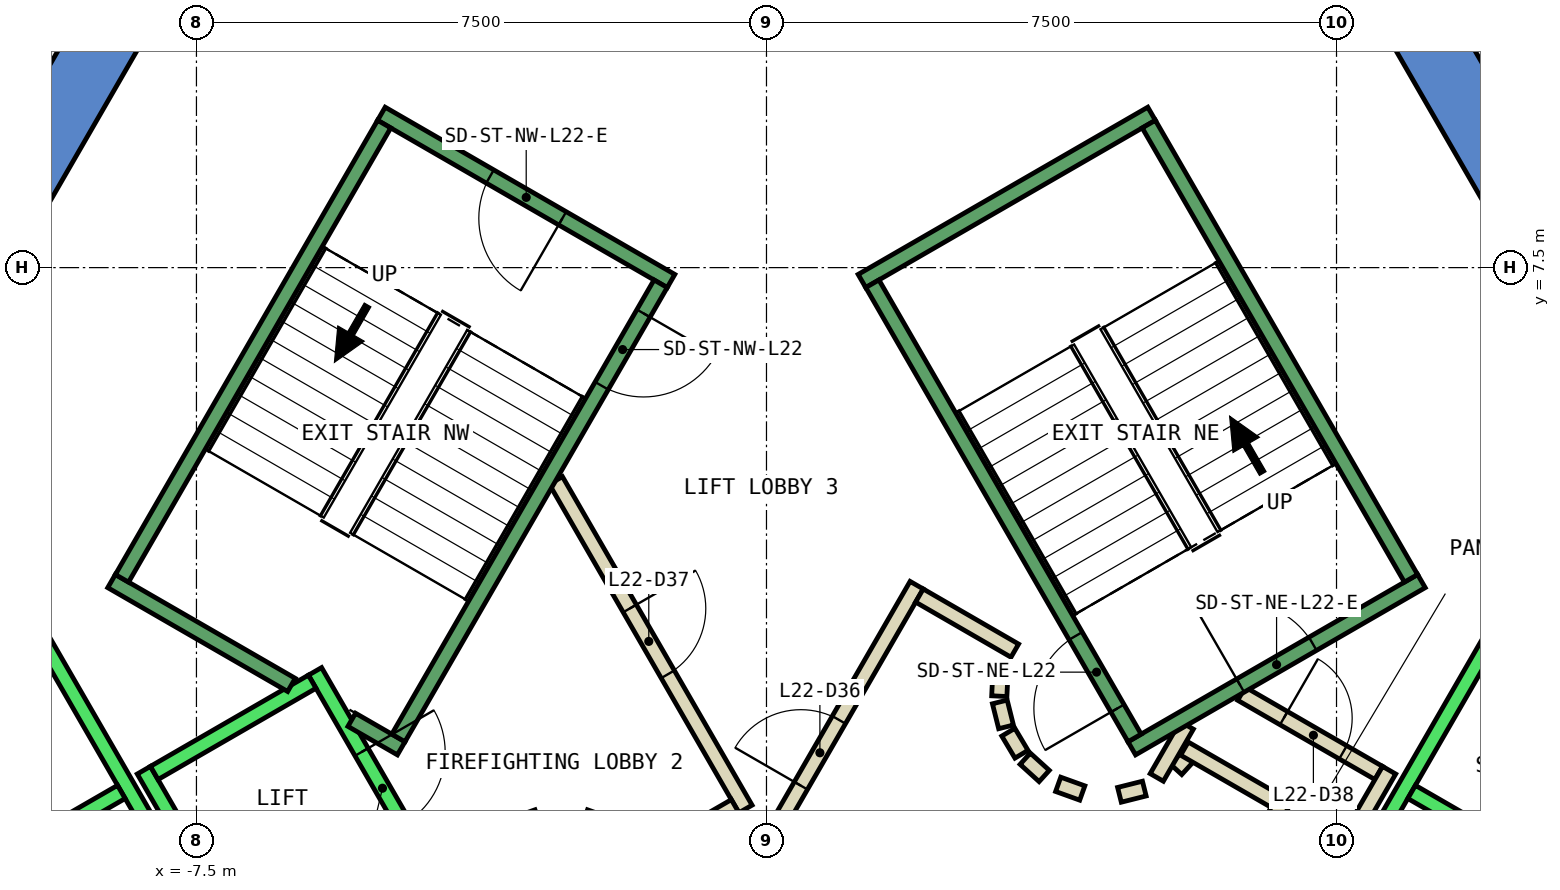
"""IFC4 building model, lengths in metres.
Left out: names, types, materials, properties, quantities, classifications, styles, units other than length and angle.
Written with IfcOpenShell. Run it as: python <this file> out.ifc"""

import sys

from ifc_helpers import new_model, si_unit, direction, frame, frame_2d, origin, place, context, subcontext, project, spatial, polyline, rectangle, outline, extrude, element, fill, save


model = new_model("IFC4")
c1 = context("Model", 3, precision=1e-05, world=origin(), true_north=direction((0.0, 1.0)))
c2 = subcontext(c1, "Body", "Model", "MODEL_VIEW")
j1 = project(units=[si_unit("LENGTHUNIT", "METRE"), si_unit("PLANEANGLEUNIT", "RADIAN")], contexts=[c1])
p1 = place(None, origin())
s1 = spatial("IfcSite", under=j1, at=p1, CompositionType="ELEMENT")
p2 = place(p1, origin())
s2 = spatial("IfcBuilding", under=s1, at=p2, CompositionType="ELEMENT")
p3 = place(p2, frame((0.0, 0.0, 103.4)))
s3 = spatial("IfcBuildingStorey", under=s2, at=p3, CompositionType="ELEMENT", Elevation=103.4)
p4 = place(p3, frame((0.0, 0.0, -0.4)))
e1 = element("IfcWall", 1, at=p4, inside=s3, PredefinedType="SHEAR", context=c2, shape_type="SweptSolid", body=[
    extrude(outline(polyline([(8.517, 11.748), (7.738, 11.298), (12.817, 2.5), (13.856, 2.5), (8.517, 11.748)])), origin(), (0.0, 0.0, 1.0), 4.2),
])
p5 = place(p3, frame((0.0, 0.0, -0.4)))
e2 = element("IfcWall", 2, at=p5, inside=s3, PredefinedType="SHEAR", context=c2, shape_type="SweptSolid", body=[
    extrude(outline(polyline([(-12.267, 5.252), (-11.488, 4.802), (-6.409, 13.6), (-6.928, 14.5), (-12.267, 5.252)])), origin(), (0.0, 0.0, 1.0), 4.2),
])
p6 = place(p3, frame((0.0, 0.0, -0.4)))
e3 = element("IfcWall", 3, at=p6, inside=s3, PredefinedType="SHEAR", context=c2, shape_type="SweptSolid", body=[
    extrude(outline(polyline([(-13.856, 2.5), (-6.928, -9.5), (-6.409, -8.6), (-12.817, 2.5), (-13.856, 2.5)])), origin(), (0.0, 0.0, 1.0), 4.2),
])
p7 = place(p3, frame((5.39, 0.898, 0.0), z_axis=(0.0, 0.0, 1.0), x_axis=(0.673828488714, 0.738887791073, 0.0)))
e4 = element("IfcWall", 4, at=p7, inside=s3, PredefinedType="PARTITIONING", context=c2, shape_type="SweptSolid", body=[
    extrude(rectangle(XDim=0.263, YDim=0.2, at=frame_2d((0.131, 0.0))), origin(), (0.0, 0.0, 1.0), 3.8),
])
p8 = place(p3, frame((5.499, 1.172, 0.0), z_axis=(0.0, 0.0, 1.0), x_axis=(0.866333505267, -0.499465972466, 0.0)))
e5 = element("IfcWall", 5, at=p8, inside=s3, PredefinedType="PARTITIONING", context=c2, shape_type="SweptSolid", body=[
    extrude(rectangle(XDim=1.374, YDim=0.2, at=frame_2d((0.687, 0.0))), origin(), (0.0, 0.0, 1.0), 3.8),
])
p9 = place(p3, frame((6.826, 0.522, 0.0), z_axis=(0.0, 0.0, 1.0), x_axis=(-0.500016722714, -0.866015748706, 0.0)))
e6 = element("IfcWall", 6, at=p9, inside=s3, PredefinedType="PARTITIONING", context=c2, shape_type="SweptSolid", body=[
    extrude(rectangle(XDim=1.7, YDim=0.2, at=frame_2d((0.85, 0.0))), origin(), (0.0, 0.0, 1.0), 3.8),
])
p10 = place(p3, frame((6.25, 1.894, 0.0), z_axis=(0.0, 0.0, 1.0), x_axis=(0.866043184279, -0.499969202016, 0.0)))
e7 = element("IfcWall", 7, at=p10, inside=s3, PredefinedType="PARTITIONING", context=c2, shape_type="SweptSolid", body=[
    extrude(rectangle(XDim=2.084, YDim=0.2, at=frame_2d((1.042, 0.0))), origin(), (0.0, 0.0, 1.0), 3.8),
])
p11 = place(p10, frame((0.642, 0.0, 0.0)))
e8 = element("IfcOpeningElement", 8, at=p11, cuts=e7, PredefinedType="OPENING", context=c2, shape_type="SweptSolid", body=[
    extrude(rectangle(XDim=0.9, YDim=2.1, at=frame_2d((0.45, 1.05))), frame((0.0, 0.11, 0.0), z_axis=(0.0, -1.0, 0.0), x_axis=(1.0, 0.0, 0.0)), (0.0, 0.0, 1.0), 0.22),
])
p12 = place(p3, frame((8.192, 0.888, 0.0), z_axis=(0.0, 0.0, 1.0), x_axis=(-0.499940625693, -0.866059680843, 0.0)))
e9 = element("IfcWall", 9, at=p12, inside=s3, PredefinedType="PARTITIONING", context=c2, shape_type="SweptSolid", body=[
    extrude(rectangle(XDim=2.68, YDim=0.2, at=frame_2d((1.34, 0.0))), origin(), (0.0, 0.0, 1.0), 3.8),
])
p13 = place(p3, frame((5.135, 0.793, 0.0), z_axis=(0.0, 0.0, 1.0), x_axis=(0.499526442893, 0.866298639529, 0.0)))
e10 = element("IfcWall", 10, at=p13, inside=s3, PredefinedType="PARTITIONING", context=c2, shape_type="SweptSolid", body=[
    extrude(rectangle(XDim=0.791, YDim=0.2, at=frame_2d((0.396, 0.0))), origin(), (0.0, 0.0, 1.0), 3.8),
])
p14 = place(p3, frame((-0.52, -1.0, 0.0), z_axis=(0.0, 0.0, 1.0), x_axis=(0.50011622646, 0.865958290007, 0.0)))
e11 = element("IfcWall", 11, at=p14, inside=s3, PredefinedType="PARTITIONING", context=c2, shape_type="SweptSolid", body=[
    extrude(rectangle(XDim=4.991, YDim=0.2, at=frame_2d((2.496, 0.0))), origin(), (0.0, 0.0, 1.0), 3.8),
])
p15 = place(p14, frame((1.945, 0.0, 0.0)))
e12 = element("IfcOpeningElement", 12, at=p15, cuts=e11, PredefinedType="OPENING", context=c2, shape_type="SweptSolid", body=[
    extrude(rectangle(XDim=1.0, YDim=2.1, at=frame_2d((0.5, 1.05))), frame((0.0, 0.11, 0.0), z_axis=(0.0, -1.0, 0.0), x_axis=(1.0, 0.0, 0.0)), (0.0, 0.0, 1.0), 0.22),
])
p16 = place(p3, frame((2.012, 3.186, 0.0), z_axis=(0.0, 0.0, 1.0), x_axis=(0.865891012941, -0.500232699559, 0.0)))
e13 = element("IfcWall", 13, at=p16, inside=s3, PredefinedType="PARTITIONING", context=c2, shape_type="SweptSolid", body=[
    extrude(rectangle(XDim=1.449, YDim=0.2, at=frame_2d((0.725, 0.0))), origin(), (0.0, 0.0, 1.0), 3.8),
])
p17 = place(p3, frame((3.079, 2.199, 0.0), z_axis=(0.0, 0.0, 1.0), x_axis=(-0.047771483479, -0.998858290933, 0.0)))
e14 = element("IfcWall", 14, at=p17, inside=s3, PredefinedType="PARTITIONING", context=c2, shape_type="SweptSolid", body=[
    extrude(rectangle(XDim=0.337, YDim=0.2, at=frame_2d((0.169, 0.0))), origin(), (0.0, 0.0, 1.0), 3.8),
])
p18 = place(p3, frame((3.07, 1.786, 0.0), z_axis=(0.0, 0.0, 1.0), x_axis=(0.242705583207, -0.970099994784, 0.0)))
e15 = element("IfcWall", 15, at=p18, inside=s3, PredefinedType="PARTITIONING", context=c2, shape_type="SweptSolid", body=[
    extrude(rectangle(XDim=0.338, YDim=0.2, at=frame_2d((0.169, 0.0))), origin(), (0.0, 0.0, 1.0), 3.8),
])
for number, where, z_axis, x_axis in (
    (16, (3.182, 1.388, 0.0), (0.0, 0.0, 1.0), (0.512, -0.859, 0.0)),
    (17, (3.404, 1.039, 0.0), (0.0, 0.0, 1.0), (0.74, -0.672, 0.0)),
):
    element("IfcWall", number, at=place(p3, frame(where, z_axis=z_axis, x_axis=x_axis)), inside=s3, PredefinedType="PARTITIONING", context=c2, shape_type="SweptSolid", body=[
        extrude(rectangle(XDim=0.338, YDim=0.2, at=frame_2d((0.169, 0.0))), origin(), (0.0, 0.0, 1.0), 3.8),
    ])
p19 = place(p3, frame((3.838, 0.702, 0.0), z_axis=(0.0, 0.0, 1.0), x_axis=(0.941035081519, -0.338308993895, 0.0)))
e18 = element("IfcWall", 18, at=p19, inside=s3, PredefinedType="PARTITIONING", context=c2, shape_type="SweptSolid", body=[
    extrude(rectangle(XDim=0.337, YDim=0.2, at=frame_2d((0.168, 0.0))), origin(), (0.0, 0.0, 1.0), 3.8),
])
p20 = place(p3, frame((4.644, 0.564, 0.0), z_axis=(0.0, 0.0, 1.0), x_axis=(0.969929076366, 0.243387729394, 0.0)))
e19 = element("IfcWall", 19, at=p20, inside=s3, PredefinedType="PARTITIONING", context=c2, shape_type="SweptSolid", body=[
    extrude(rectangle(XDim=0.337, YDim=0.2, at=frame_2d((0.168, 0.0))), origin(), (0.0, 0.0, 1.0), 3.8),
])
p21 = place(p3, frame((-2.771, 4.7, 0.0), z_axis=(0.0, 0.0, 1.0), x_axis=(0.499969479948, -0.866043023828, 0.0)))
e20 = element("IfcWall", 20, at=p21, inside=s3, PredefinedType="PARTITIONING", context=c2, shape_type="SweptSolid", body=[
    extrude(rectangle(XDim=4.99, YDim=0.2, at=frame_2d((2.495, 0.0))), origin(), (0.0, 0.0, 1.0), 3.8),
])
p22 = place(p21, frame((1.945, 0.0, 0.0)))
e21 = element("IfcOpeningElement", 21, at=p22, cuts=e20, PredefinedType="OPENING", context=c2, shape_type="SweptSolid", body=[
    extrude(rectangle(XDim=1.0, YDim=2.1, at=frame_2d((0.5, 1.05))), frame((0.0, 0.11, 0.0), z_axis=(0.0, -1.0, 0.0), x_axis=(1.0, 0.0, 0.0)), (0.0, 0.0, 1.0), 0.22),
])
p23 = place(p3, frame((-0.412, 0.414, 0.0), z_axis=(0.0, 0.0, 1.0), x_axis=(-0.866017369001, -0.500013916395, 0.0)))
e22 = element("IfcWall", 22, at=p23, inside=s3, PredefinedType="PARTITIONING", context=c2, shape_type="SweptSolid", body=[
    extrude(rectangle(XDim=1.45, YDim=0.2, at=frame_2d((0.725, 0.0))), origin(), (0.0, 0.0, 1.0), 3.8),
])
p24 = place(p3, frame((-2.07, 0.16, 0.0), z_axis=(0.0, 0.0, 1.0), x_axis=(-0.942199461132, 0.335052496547, 0.0)))
e23 = element("IfcWall", 23, at=p24, inside=s3, PredefinedType="PARTITIONING", context=c2, shape_type="SweptSolid", body=[
    extrude(rectangle(XDim=0.337, YDim=0.2, at=frame_2d((0.169, 0.0))), origin(), (0.0, 0.0, 1.0), 3.8),
])
p25 = place(p3, frame((-3.012, 0.273, 0.0), z_axis=(0.0, 0.0, 1.0), x_axis=(-0.942280615813, -0.334824194261, 0.0)))
e24 = element("IfcWall", 24, at=p25, inside=s3, PredefinedType="PARTITIONING", context=c2, shape_type="SweptSolid", body=[
    extrude(rectangle(XDim=0.338, YDim=0.2, at=frame_2d((0.169, 0.0))), origin(), (0.0, 0.0, 1.0), 3.8),
])
p26 = place(p3, frame((-5.94, 2.188, 0.0), z_axis=(0.0, 0.0, 1.0), x_axis=(0.49994636267, -0.866056369097, 0.0)))
e25 = element("IfcWall", 25, at=p26, inside=s3, PredefinedType="STANDARD", context=c2, shape_type="SweptSolid", body=[
    extrude(rectangle(XDim=2.8, YDim=0.2, at=frame_2d((1.4, 0.0))), origin(), (0.0, 0.0, 1.0), 3.8),
])
p27 = place(p26, frame((1.225, 0.0, 0.0)))
e26 = element("IfcOpeningElement", 26, at=p27, cuts=e25, PredefinedType="OPENING", context=c2, shape_type="SweptSolid", body=[
    extrude(rectangle(XDim=1.1, YDim=2.1, at=frame_2d((0.55, 1.05))), frame((0.0, 0.11, 0.0), z_axis=(0.0, -1.0, 0.0), x_axis=(1.0, 0.0, 0.0)), (0.0, 0.0, 1.0), 0.22),
])
p28 = place(p3, frame((-8.192, 0.888, 0.0), z_axis=(0.0, 0.0, 1.0), x_axis=(0.49994636267, -0.866056369097, 0.0)))
e27 = element("IfcWall", 27, at=p28, inside=s3, PredefinedType="STANDARD", context=c2, shape_type="SweptSolid", body=[
    extrude(rectangle(XDim=2.8, YDim=0.2, at=frame_2d((1.4, 0.0))), origin(), (0.0, 0.0, 1.0), 3.8),
])
p29 = place(p3, frame((-5.977, 2.052, 0.0), z_axis=(0.0, 0.0, 1.0), x_axis=(-0.865973769406, -0.500089422704, 0.0)))
e28 = element("IfcWall", 28, at=p29, inside=s3, PredefinedType="STANDARD", context=c2, shape_type="SweptSolid", body=[
    extrude(rectangle(XDim=2.399, YDim=0.2, at=frame_2d((1.2, 0.0))), origin(), (0.0, 0.0, 1.0), 3.8),
])
p30 = place(p3, frame((-9.751, 2.99, 0.0), z_axis=(0.0, 0.0, 1.0), x_axis=(0.50000090737, -0.866024879913, 0.0)))
e29 = element("IfcWall", 29, at=p30, inside=s3, PredefinedType="STANDARD", context=c2, shape_type="SweptSolid", body=[
    extrude(rectangle(XDim=10.6, YDim=0.2, at=frame_2d((5.3, 0.0))), origin(), (0.0, 0.0, 1.0), 3.8),
])
p31 = place(p3, frame((-8.488, 0.602, 0.0), z_axis=(0.0, 0.0, 1.0), x_axis=(-0.866022959057, -0.500004234368, 0.0)))
e30 = element("IfcWall", 30, at=p31, inside=s3, PredefinedType="STANDARD", context=c2, shape_type="SweptSolid", body=[
    extrude(rectangle(XDim=2.5, YDim=0.2, at=frame_2d((1.25, 0.0))), origin(), (0.0, 0.0, 1.0), 3.8),
])
p32 = place(p3, frame((4.451, -6.19, 0.0), z_axis=(0.0, 0.0, 1.0), x_axis=(0.50000090737, 0.866024879913, 0.0)))
e31 = element("IfcWall", 31, at=p32, inside=s3, PredefinedType="STANDARD", context=c2, shape_type="SweptSolid", body=[
    extrude(rectangle(XDim=10.6, YDim=0.2, at=frame_2d((5.3, 0.0))), origin(), (0.0, 0.0, 1.0), 3.8),
])
p33 = place(p3, frame((8.488, 0.602, 0.0), z_axis=(0.0, 0.0, 1.0), x_axis=(0.866022959057, -0.500004234368, 0.0)))
e32 = element("IfcWall", 32, at=p33, inside=s3, PredefinedType="STANDARD", context=c2, shape_type="SweptSolid", body=[
    extrude(rectangle(XDim=2.5, YDim=0.2, at=frame_2d((1.25, 0.0))), origin(), (0.0, 0.0, 1.0), 3.8),
])
p34 = place(p3, frame((4.806, 1.176, 0.0), z_axis=(0.0, 0.0, 1.0), x_axis=(0.866059941101, 0.499940174841, 0.0)))
e33 = element("IfcWall", 33, at=p34, inside=s3, PredefinedType="STANDARD", context=c2, shape_type="SweptSolid", body=[
    extrude(rectangle(XDim=4.4, YDim=0.2, at=frame_2d((2.2, 0.0))), origin(), (0.0, 0.0, 1.0), 3.8),
])
p35 = place(p34, frame((1.65, 0.0, 0.0)))
e34 = element("IfcOpeningElement", 34, at=p35, cuts=e33, PredefinedType="OPENING", context=c2, shape_type="SweptSolid", body=[
    extrude(rectangle(XDim=1.1, YDim=2.2, at=frame_2d((0.55, 1.1))), frame((0.0, 0.11, 0.0), z_axis=(0.0, -1.0, 0.0), x_axis=(1.0, 0.0, 0.0)), (0.0, 0.0, 1.0), 0.22),
])
p36 = place(p3, frame((1.256, 7.324, 0.0), z_axis=(0.0, 0.0, 1.0), x_axis=(0.866046073146, 0.499964197906, 0.0)))
e35 = element("IfcWall", 35, at=p36, inside=s3, PredefinedType="STANDARD", context=c2, shape_type="SweptSolid", body=[
    extrude(rectangle(XDim=4.4, YDim=0.2, at=frame_2d((2.2, 0.0))), origin(), (0.0, 0.0, 1.0), 3.8),
])
p37 = place(p3, frame((4.843, 1.312, 0.0), z_axis=(0.0, 0.0, 1.0), x_axis=(-0.499963383562, 0.866046543262, 0.0)))
e36 = element("IfcWall", 36, at=p37, inside=s3, PredefinedType="STANDARD", context=c2, shape_type="SweptSolid", body=[
    extrude(rectangle(XDim=6.9, YDim=0.2, at=frame_2d((3.45, 0.0))), origin(), (0.0, 0.0, 1.0), 3.8),
])
p38 = place(p37, frame((0.45, 0.0, 0.0)))
e37 = element("IfcOpeningElement", 37, at=p38, cuts=e36, PredefinedType="OPENING", context=c2, shape_type="SweptSolid", body=[
    extrude(rectangle(XDim=1.1, YDim=2.2, at=frame_2d((0.55, 1.1))), frame((0.0, 0.11, 0.0), z_axis=(0.0, -1.0, 0.0), x_axis=(1.0, 0.0, 0.0)), (0.0, 0.0, 1.0), 0.22),
])
p39 = place(p3, frame((8.48, 3.412, 0.0), z_axis=(0.0, 0.0, 1.0), x_axis=(-0.499978703459, 0.866037698999, 0.0)))
e38 = element("IfcWall", 38, at=p39, inside=s3, PredefinedType="STANDARD", context=c2, shape_type="SweptSolid", body=[
    extrude(rectangle(XDim=6.9, YDim=0.2, at=frame_2d((3.45, 0.0))), origin(), (0.0, 0.0, 1.0), 3.8),
])
p40 = place(p3, frame((-1.256, 7.324, 0.0), z_axis=(0.0, 0.0, 1.0), x_axis=(-0.866046073146, 0.499964197906, 0.0)))
e39 = element("IfcWall", 39, at=p40, inside=s3, PredefinedType="STANDARD", context=c2, shape_type="SweptSolid", body=[
    extrude(rectangle(XDim=4.4, YDim=0.2, at=frame_2d((2.2, 0.0))), origin(), (0.0, 0.0, 1.0), 3.8),
])
p41 = place(p40, frame((1.65, 0.0, 0.0)))
e40 = element("IfcOpeningElement", 40, at=p41, cuts=e39, PredefinedType="OPENING", context=c2, shape_type="SweptSolid", body=[
    extrude(rectangle(XDim=1.1, YDim=2.2, at=frame_2d((0.55, 1.1))), frame((0.0, 0.11, 0.0), z_axis=(0.0, -1.0, 0.0), x_axis=(1.0, 0.0, 0.0)), (0.0, 0.0, 1.0), 0.22),
])
p42 = place(p3, frame((-6.25, 2.01, 0.0), z_axis=(0.0, 0.0, 1.0), x_axis=(-0.86611865017, 0.499838457731, 0.0)))
e41 = element("IfcWall", 41, at=p42, inside=s3, PredefinedType="STANDARD", context=c2, shape_type="SweptSolid", body=[
    extrude(rectangle(XDim=2.733, YDim=0.2, at=frame_2d((1.366, 0.0))), origin(), (0.0, 0.0, 1.0), 3.8),
])
p43 = place(p3, frame((-4.806, 1.176, 0.0), z_axis=(0.0, 0.0, 1.0), x_axis=(-0.866558586415, 0.499075361355, 0.0)))
e42 = element("IfcWall", 42, at=p43, inside=s3, PredefinedType="STANDARD", context=c2, shape_type="SweptSolid", body=[
    extrude(rectangle(XDim=0.751, YDim=0.2, at=frame_2d((0.376, 0.0))), origin(), (0.0, 0.0, 1.0), 3.8),
])
p44 = place(p3, frame((-1.393, 7.288, 0.0), z_axis=(0.0, 0.0, 1.0), x_axis=(-0.499963383562, -0.866046543262, 0.0)))
e43 = element("IfcWall", 43, at=p44, inside=s3, PredefinedType="STANDARD", context=c2, shape_type="SweptSolid", body=[
    extrude(rectangle(XDim=6.9, YDim=0.2, at=frame_2d((3.45, 0.0))), origin(), (0.0, 0.0, 1.0), 3.8),
])
p45 = place(p44, frame((0.45, 0.0, 0.0)))
e44 = element("IfcOpeningElement", 44, at=p45, cuts=e43, PredefinedType="OPENING", context=c2, shape_type="SweptSolid", body=[
    extrude(rectangle(XDim=1.1, YDim=2.2, at=frame_2d((0.55, 1.1))), frame((0.0, 0.11, 0.0), z_axis=(0.0, -1.0, 0.0), x_axis=(1.0, 0.0, 0.0)), (0.0, 0.0, 1.0), 0.22),
])
p46 = place(p3, frame((-5.03, 9.388, 0.0), z_axis=(0.0, 0.0, 1.0), x_axis=(-0.499978703459, -0.866037698999, 0.0)))
e45 = element("IfcWall", 45, at=p46, inside=s3, PredefinedType="STANDARD", context=c2, shape_type="SweptSolid", body=[
    extrude(rectangle(XDim=6.9, YDim=0.2, at=frame_2d((3.45, 0.0))), origin(), (0.0, 0.0, 1.0), 3.8),
])
p47 = place(p15, origin())
e46 = element("IfcDoor", 46, at=p47, inside=s3, OperationType="SINGLE_SWING_LEFT", PredefinedType="DOOR", context=c2, shape_type="SweptSolid", body=[
    extrude(rectangle(XDim=1.0, YDim=2.1, at=frame_2d((0.5, 1.05))), frame((0.0, 0.025, 0.0), z_axis=(0.0, -1.0, 0.0), x_axis=(1.0, 0.0, 0.0)), (0.0, 0.0, 1.0), 0.05),
])
fill(e12, e46)
p48 = place(p22, origin())
e47 = element("IfcDoor", 47, at=p48, inside=s3, OperationType="SINGLE_SWING_RIGHT", PredefinedType="DOOR", context=c2, shape_type="SweptSolid", body=[
    extrude(rectangle(XDim=1.0, YDim=2.1, at=frame_2d((0.5, 1.05))), frame((0.0, 0.025, 0.0), z_axis=(0.0, -1.0, 0.0), x_axis=(1.0, 0.0, 0.0)), (0.0, 0.0, 1.0), 0.05),
])
fill(e21, e47)
p49 = place(p11, origin())
e48 = element("IfcDoor", 48, at=p49, inside=s3, OperationType="SINGLE_SWING_LEFT", PredefinedType="DOOR", context=c2, shape_type="SweptSolid", body=[
    extrude(rectangle(XDim=0.9, YDim=2.1, at=frame_2d((0.45, 1.05))), frame((0.0, 0.025, 0.0), z_axis=(0.0, -1.0, 0.0), x_axis=(1.0, 0.0, 0.0)), (0.0, 0.0, 1.0), 0.05),
])
fill(e8, e48)
p50 = place(p27, origin())
e49 = element("IfcDoor", 49, at=p50, inside=s3, OperationType="SLIDING_TO_LEFT", PredefinedType="DOOR", context=c2, shape_type="SweptSolid", body=[
    extrude(rectangle(XDim=1.1, YDim=2.1, at=frame_2d((0.55, 1.05))), frame((0.0, 0.025, 0.0), z_axis=(0.0, -1.0, 0.0), x_axis=(1.0, 0.0, 0.0)), (0.0, 0.0, 1.0), 0.05),
])
fill(e26, e49)
p51 = place(p38, origin())
e50 = element("IfcDoor", 50, at=p51, inside=s3, OperationType="SINGLE_SWING_LEFT", PredefinedType="DOOR", context=c2, shape_type="SweptSolid", body=[
    extrude(rectangle(XDim=1.1, YDim=2.2, at=frame_2d((0.55, 1.1))), frame((0.0, 0.025, 0.0), z_axis=(0.0, -1.0, 0.0), x_axis=(1.0, 0.0, 0.0)), (0.0, 0.0, 1.0), 0.05),
])
fill(e37, e50)
p52 = place(p35, origin())
e51 = element("IfcDoor", 51, at=p52, inside=s3, OperationType="SINGLE_SWING_LEFT", PredefinedType="DOOR", context=c2, shape_type="SweptSolid", body=[
    extrude(rectangle(XDim=1.1, YDim=2.2, at=frame_2d((0.55, 1.1))), frame((0.0, 0.025, 0.0), z_axis=(0.0, -1.0, 0.0), x_axis=(1.0, 0.0, 0.0)), (0.0, 0.0, 1.0), 0.05),
])
fill(e34, e51)
p53 = place(p45, origin())
e52 = element("IfcDoor", 52, at=p53, inside=s3, OperationType="SINGLE_SWING_LEFT", PredefinedType="DOOR", context=c2, shape_type="SweptSolid", body=[
    extrude(rectangle(XDim=1.1, YDim=2.2, at=frame_2d((0.55, 1.1))), frame((0.0, 0.025, 0.0), z_axis=(0.0, -1.0, 0.0), x_axis=(1.0, 0.0, 0.0)), (0.0, 0.0, 1.0), 0.05),
])
fill(e44, e52)
p54 = place(p41, origin())
e53 = element("IfcDoor", 53, at=p54, inside=s3, OperationType="SINGLE_SWING_LEFT", PredefinedType="DOOR", context=c2, shape_type="SweptSolid", body=[
    extrude(rectangle(XDim=1.1, YDim=2.2, at=frame_2d((0.55, 1.1))), frame((0.0, 0.025, 0.0), z_axis=(0.0, -1.0, 0.0), x_axis=(1.0, 0.0, 0.0)), (0.0, 0.0, 1.0), 0.05),
])
fill(e40, e53)
save(model, sys.argv[1])
